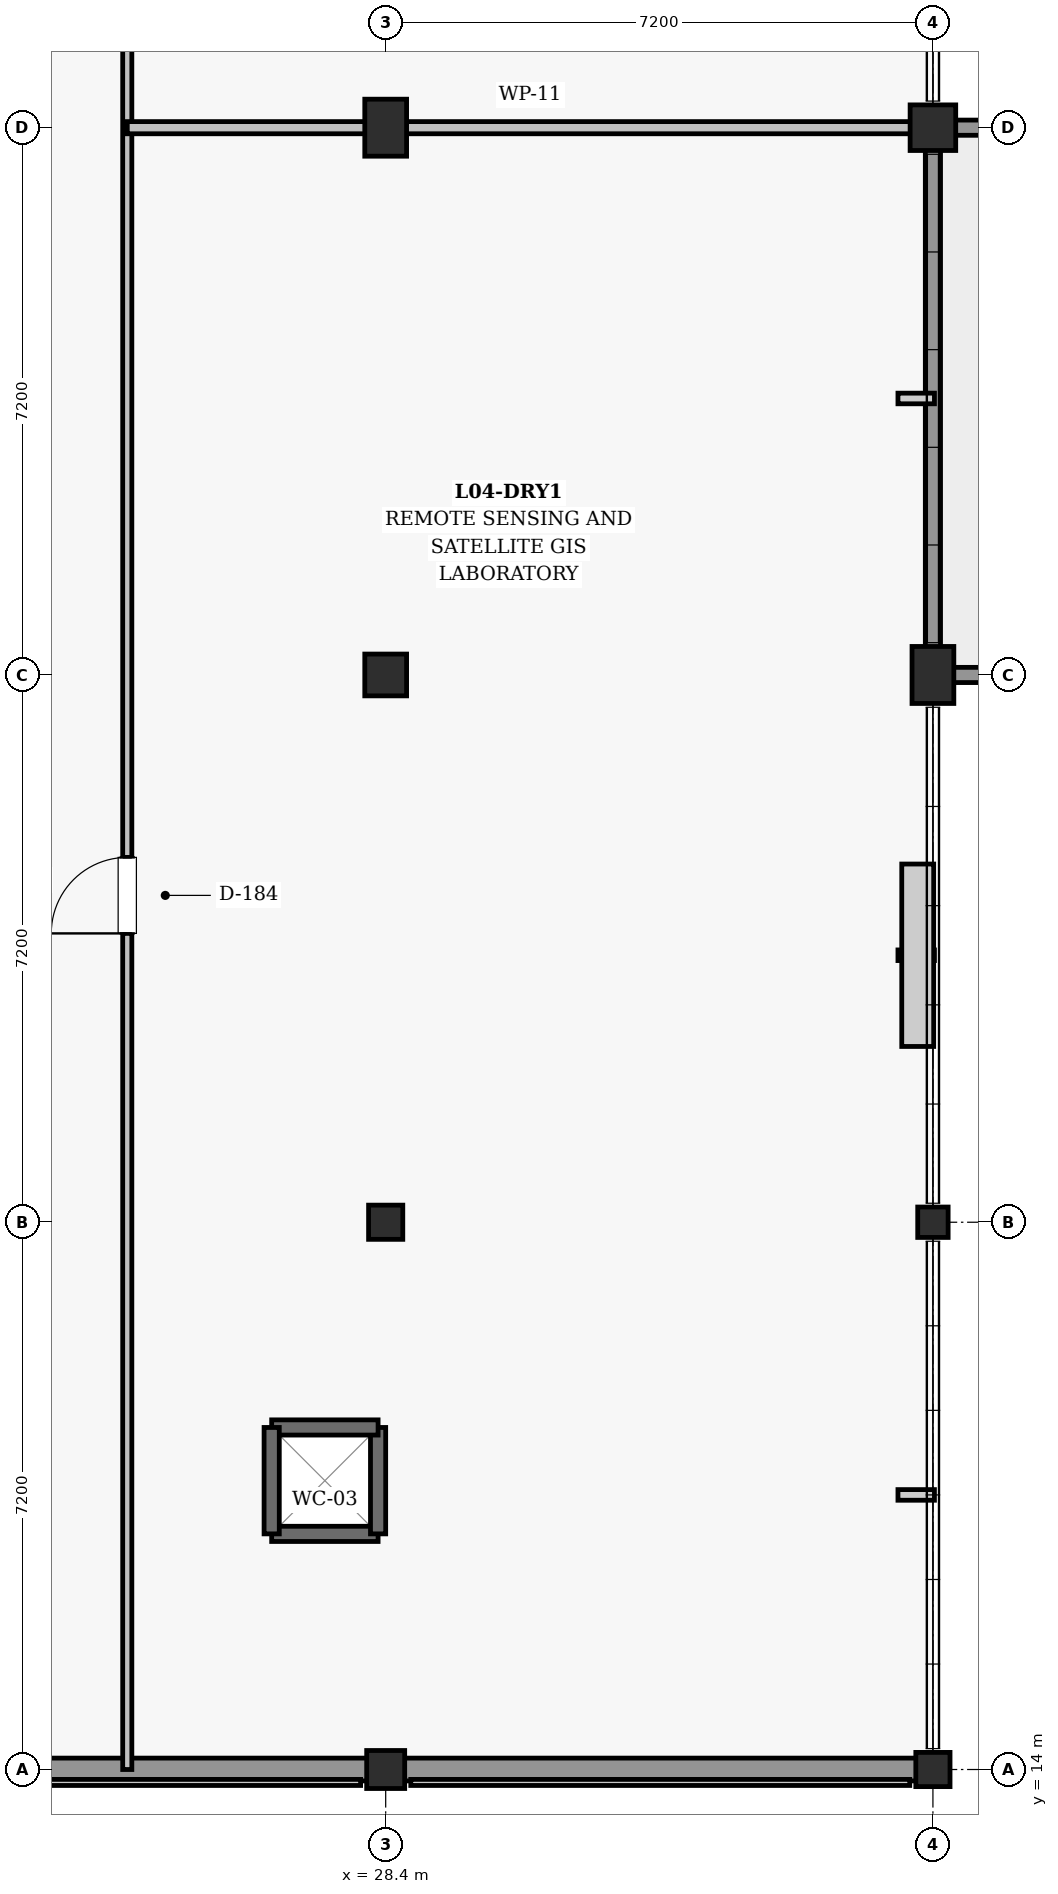
"""IFC4 building model, lengths in metres.
Left out: names, types, materials, properties, quantities, classifications, styles, units other than length and angle.
Written with IfcOpenShell. Run it as: python <this file> out.ifc"""

import sys

from ifc_helpers import new_model, si_unit, direction, frame, frame_2d, origin, origin_2d, place, context, subcontext, project, spatial, rectangle, extrude, element, fill, save


model = new_model("IFC4")
c1 = context("Model", 3, precision=1e-05, world=origin(), true_north=direction((0.0, 1.0)))
c2 = subcontext(c1, "Body", "Model", "MODEL_VIEW")
j1 = project(units=[si_unit("LENGTHUNIT", "METRE"), si_unit("PLANEANGLEUNIT", "RADIAN")], contexts=[c1])
p1 = place(None, origin())
s1 = spatial("IfcSite", under=j1, at=p1, CompositionType="ELEMENT")
p2 = place(p1, origin())
s2 = spatial("IfcBuilding", under=s1, at=p2, CompositionType="ELEMENT")
p3 = place(p2, frame((0.0, 0.0, 18.9)))
s3 = spatial("IfcBuildingStorey", under=s2, at=p3, CompositionType="ELEMENT", Elevation=18.9)
p4 = place(p3, frame((28.4, 14.0, 0.0), z_axis=(0.0, 0.0, 1.0), x_axis=(1.0, 0.0, 0.0)))
e1 = element("IfcColumn", 1, at=p4, inside=s3, PredefinedType="COLUMN", context=c2, shape_type="SweptSolid", body=[
    extrude(rectangle(XDim=0.5, YDim=0.5, at=origin_2d()), origin(), (0.0, 0.0, 1.0), 4.5),
])
p5 = place(p3, frame((28.4, 21.2, 0.0), z_axis=(0.0, 0.0, 1.0), x_axis=(1.0, 0.0, 0.0)))
e2 = element("IfcColumn", 2, at=p5, inside=s3, PredefinedType="COLUMN", context=c2, shape_type="SweptSolid", body=[
    extrude(rectangle(XDim=0.45, YDim=0.45, at=origin_2d()), origin(), (0.0, 0.0, 1.0), 4.5),
])
p6 = place(p3, frame((28.4, 28.4, 0.0), z_axis=(0.0, 0.0, 1.0), x_axis=(1.0, 0.0, 0.0)))
e3 = element("IfcColumn", 3, at=p6, inside=s3, PredefinedType="COLUMN", context=c2, shape_type="SweptSolid", body=[
    extrude(rectangle(XDim=0.55, YDim=0.55, at=origin_2d()), origin(), (0.0, 0.0, 1.0), 4.5),
])
p7 = place(p3, frame((28.4, 35.6, 0.0), z_axis=(0.0, 0.0, 1.0), x_axis=(1.0, 0.0, 0.0)))
e4 = element("IfcColumn", 4, at=p7, inside=s3, PredefinedType="COLUMN", context=c2, shape_type="SweptSolid", body=[
    extrude(rectangle(XDim=0.55, YDim=0.75, at=origin_2d()), origin(), (0.0, 0.0, 1.0), 4.5),
])
p8 = place(p3, frame((35.6, 14.0, 0.0), z_axis=(0.0, 0.0, 1.0), x_axis=(1.0, 0.0, 0.0)))
e5 = element("IfcColumn", 5, at=p8, inside=s3, PredefinedType="COLUMN", context=c2, shape_type="SweptSolid", body=[
    extrude(rectangle(XDim=0.45, YDim=0.45, at=origin_2d()), origin(), (0.0, 0.0, 1.0), 4.5),
])
p9 = place(p3, frame((35.6, 21.2, 0.0), z_axis=(0.0, 0.0, 1.0), x_axis=(1.0, 0.0, 0.0)))
e6 = element("IfcColumn", 6, at=p9, inside=s3, PredefinedType="COLUMN", context=c2, shape_type="SweptSolid", body=[
    extrude(rectangle(XDim=0.4, YDim=0.4, at=origin_2d()), origin(), (0.0, 0.0, 1.0), 4.5),
])
p10 = place(p3, frame((35.6, 28.4, 0.0), z_axis=(0.0, 0.0, 1.0), x_axis=(1.0, 0.0, 0.0)))
e7 = element("IfcColumn", 7, at=p10, inside=s3, PredefinedType="COLUMN", context=c2, shape_type="SweptSolid", body=[
    extrude(rectangle(XDim=0.55, YDim=0.75, at=origin_2d()), origin(), (0.0, 0.0, 1.0), 4.5),
])
p11 = place(p3, frame((35.6, 35.6, 0.0), z_axis=(0.0, 0.0, 1.0), x_axis=(1.0, 0.0, 0.0)))
e8 = element("IfcColumn", 8, at=p11, inside=s3, PredefinedType="COLUMN", context=c2, shape_type="SweptSolid", body=[
    extrude(rectangle(XDim=0.6, YDim=0.6, at=origin_2d()), origin(), (0.0, 0.0, 1.0), 4.5),
])
p12 = place(p3, frame((21.38, 14.0, 0.0), z_axis=(0.0, 0.0, 1.0), x_axis=(1.0, 0.0, 0.0)))
e9 = element("IfcWall", 9, at=p12, inside=s3, PredefinedType="SOLIDWALL", context=c2, shape_type="SweptSolid", body=[
    extrude(rectangle(XDim=6.79, YDim=0.3, at=frame_2d((3.395, 0.0))), origin(), (0.0, 0.0, 1.0), 3.475),
])
p13 = place(p3, frame((28.63, 14.0, 0.0), z_axis=(0.0, 0.0, 1.0), x_axis=(1.0, 0.0, 0.0)))
e10 = element("IfcWall", 10, at=p13, inside=s3, PredefinedType="SOLIDWALL", context=c2, shape_type="SweptSolid", body=[
    extrude(rectangle(XDim=6.765, YDim=0.3, at=frame_2d((3.383, 0.0))), origin(), (0.0, 0.0, 1.0), 3.575),
])
p14 = place(p3, frame((100.4, 28.4, 0.0), z_axis=(0.0, 0.0, 1.0), x_axis=(-1.0, 0.0, 0.0)))
e11 = element("IfcWall", 11, at=p14, inside=s3, PredefinedType="PARAPET", context=c2, shape_type="SweptSolid", body=[
    extrude(rectangle(XDim=64.8, YDim=0.2, at=frame_2d((32.4, 0.0))), origin(), (0.0, 0.0, 1.0), 0.95),
])
p15 = place(p3, frame((35.6, 28.4, 0.0), z_axis=(0.0, 0.0, 1.0), x_axis=(0.0, 1.0, 0.0)))
e12 = element("IfcWall", 12, at=p15, inside=s3, PredefinedType="PARAPET", context=c2, shape_type="SweptSolid", body=[
    extrude(rectangle(XDim=7.2, YDim=0.2, at=frame_2d((3.6, 0.0))), origin(), (0.0, 0.0, 1.0), 0.95),
])
p16 = place(p3, frame((35.6, 35.6, 0.0), z_axis=(0.0, 0.0, 1.0), x_axis=(1.0, 0.0, 0.0)))
e13 = element("IfcWall", 13, at=p16, inside=s3, PredefinedType="PARAPET", context=c2, shape_type="SweptSolid", body=[
    extrude(rectangle(XDim=79.2, YDim=0.2, at=frame_2d((39.6, 0.0))), origin(), (0.0, 0.0, 1.0), 0.95),
])
p17 = place(p3, frame((26.9, 17.1, 0.0), z_axis=(0.0, 0.0, 1.0), x_axis=(1.0, 0.0, 0.0)))
e14 = element("IfcWall", 14, at=p17, inside=s3, PredefinedType="SHEAR", context=c2, shape_type="SweptSolid", body=[
    extrude(rectangle(XDim=1.4, YDim=0.2, at=frame_2d((0.7, 0.0))), origin(), (0.0, 0.0, 1.0), 4.16),
])
p18 = place(p3, frame((28.3, 17.1, 0.0), z_axis=(0.0, 0.0, 1.0), x_axis=(0.0, 1.0, 0.0)))
e15 = element("IfcWall", 15, at=p18, inside=s3, PredefinedType="SHEAR", context=c2, shape_type="SweptSolid", body=[
    extrude(rectangle(XDim=1.4, YDim=0.2, at=frame_2d((0.7, 0.0))), origin(), (0.0, 0.0, 1.0), 4.16),
])
p19 = place(p3, frame((28.3, 18.5, 0.0), z_axis=(0.0, 0.0, 1.0), x_axis=(-1.0, 0.0, 0.0)))
e16 = element("IfcWall", 16, at=p19, inside=s3, PredefinedType="SHEAR", context=c2, shape_type="SweptSolid", body=[
    extrude(rectangle(XDim=1.4, YDim=0.2, at=frame_2d((0.7, 0.0))), origin(), (0.0, 0.0, 1.0), 4.16),
])
p20 = place(p3, frame((26.9, 18.5, 0.0), z_axis=(0.0, 0.0, 1.0), x_axis=(0.0, -1.0, 0.0)))
e17 = element("IfcWall", 17, at=p20, inside=s3, PredefinedType="SHEAR", context=c2, shape_type="SweptSolid", body=[
    extrude(rectangle(XDim=1.4, YDim=0.2, at=frame_2d((0.7, 0.0))), origin(), (0.0, 0.0, 1.0), 4.16),
])
p21 = place(p3, frame((25.0, 14.0, 0.0), z_axis=(0.0, 0.0, 1.0), x_axis=(0.0, 1.0, 0.0)))
e18 = element("IfcWall", 18, at=p21, inside=s3, PredefinedType="PARTITIONING", context=c2, shape_type="SweptSolid", body=[
    extrude(rectangle(XDim=88.8, YDim=0.12, at=frame_2d((44.4, 0.0))), origin(), (0.0, 0.0, 1.0), 3.38),
])
p22 = place(p21, frame((11.0, 0.0, 0.0)))
e19 = element("IfcOpeningElement", 19, at=p22, cuts=e18, PredefinedType="OPENING", context=c2, shape_type="SweptSolid", body=[
    extrude(rectangle(XDim=1.0, YDim=2.15, at=frame_2d((0.5, 1.075))), frame((0.0, 0.07, 0.0), z_axis=(0.0, -1.0, 0.0), x_axis=(1.0, 0.0, 0.0)), (0.0, 0.0, 1.0), 0.14),
])
p23 = place(p21, frame((31.5, 0.0, 0.0)))
e20 = element("IfcOpeningElement", 20, at=p23, cuts=e18, PredefinedType="OPENING", context=c2, shape_type="SweptSolid", body=[
    extrude(rectangle(XDim=1.1, YDim=2.15, at=frame_2d((0.55, 1.075))), frame((0.0, 0.07, 0.0), z_axis=(0.0, -1.0, 0.0), x_axis=(1.0, 0.0, 0.0)), (0.0, 0.0, 1.0), 0.14),
])
p24 = place(p21, frame((53.3, 0.0, 0.0)))
e21 = element("IfcOpeningElement", 21, at=p24, cuts=e18, PredefinedType="OPENING", context=c2, shape_type="SweptSolid", body=[
    extrude(rectangle(XDim=1.18, YDim=2.2, at=frame_2d((0.59, 1.1))), frame((0.0, 0.07, 0.0), z_axis=(0.0, -1.0, 0.0), x_axis=(1.0, 0.0, 0.0)), (0.0, 0.0, 1.0), 0.14),
])
p25 = place(p21, frame((69.3, 0.0, 0.0)))
e22 = element("IfcOpeningElement", 22, at=p25, cuts=e18, PredefinedType="OPENING", context=c2, shape_type="SweptSolid", body=[
    extrude(rectangle(XDim=1.25, YDim=2.2, at=frame_2d((0.625, 1.1))), frame((0.0, 0.07, 0.0), z_axis=(0.0, -1.0, 0.0), x_axis=(1.0, 0.0, 0.0)), (0.0, 0.0, 1.0), 0.14),
])
p26 = place(p21, frame((82.9, 0.0, 0.0)))
e23 = element("IfcOpeningElement", 23, at=p26, cuts=e18, PredefinedType="OPENING", context=c2, shape_type="SweptSolid", body=[
    extrude(rectangle(XDim=1.35, YDim=2.2, at=frame_2d((0.675, 1.1))), frame((0.0, 0.07, 0.0), z_axis=(0.0, -1.0, 0.0), x_axis=(1.0, 0.0, 0.0)), (0.0, 0.0, 1.0), 0.14),
])
p27 = place(p3, frame((25.0, 35.6, 0.0), z_axis=(0.0, 0.0, 1.0), x_axis=(1.0, 0.0, 0.0)))
e24 = element("IfcWall", 24, at=p27, inside=s3, PredefinedType="PARTITIONING", context=c2, shape_type="SweptSolid", body=[
    extrude(rectangle(XDim=10.6, YDim=0.16, at=frame_2d((5.3, 0.0))), origin(), (0.0, 0.0, 1.0), 3.48),
])
p28 = place(p22, origin())
e25 = element("IfcDoor", 25, at=p28, inside=s3, OperationType="SINGLE_SWING_LEFT", PredefinedType="DOOR", context=c2, shape_type="SweptSolid", body=[
    extrude(rectangle(XDim=1.0, YDim=2.15, at=frame_2d((0.5, 1.075))), frame((0.0, 0.025, 0.0), z_axis=(0.0, -1.0, 0.0), x_axis=(1.0, 0.0, 0.0)), (0.0, 0.0, 1.0), 0.05),
])
fill(e19, e25)
save(model, sys.argv[1])
